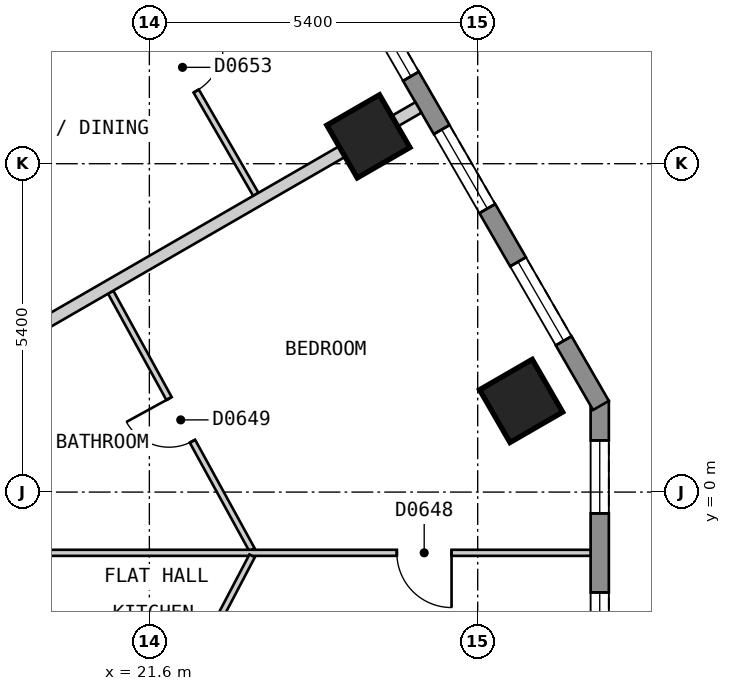
"""IFC4 building model, lengths in metres.
Left out: names, types, materials, properties, quantities, classifications, styles, units other than length and angle.
Written with IfcOpenShell. Run it as: python <this file> out.ifc"""

import sys

from ifc_helpers import new_model, si_unit, direction, frame, frame_2d, origin, origin_2d, place, context, subcontext, project, spatial, polyline, rectangle, outline, extrude, element, fill, save


model = new_model("IFC4")
c1 = context("Model", 3, precision=1e-05, world=origin(), true_north=direction((0.0, 1.0)))
c2 = subcontext(c1, "Body", "Model", "MODEL_VIEW")
j1 = project(units=[si_unit("LENGTHUNIT", "METRE"), si_unit("PLANEANGLEUNIT", "RADIAN")], contexts=[c1])
p1 = place(None, origin())
s1 = spatial("IfcSite", under=j1, at=p1, CompositionType="ELEMENT")
p2 = place(p1, origin())
s2 = spatial("IfcBuilding", under=s1, at=p2, CompositionType="ELEMENT")
p3 = place(p2, frame((0.0, 0.0, 81.0)))
s3 = spatial("IfcBuildingStorey", under=s2, at=p3, CompositionType="ELEMENT", Elevation=81.0)
for number, where, z_axis, x_axis in (
    (1, (27.714, 1.499, 0.0), (0.0, 0.0, 1.0), (-0.5, 0.866, 0.0)),
    (2, (25.202, 5.85, 0.0), (0.0, 0.0, 1.0), (-0.5, 0.866, 0.0)),
):
    element("IfcColumn", number, at=place(p3, frame(where, z_axis=z_axis, x_axis=x_axis)), inside=s3, PredefinedType="COLUMN", context=c2, shape_type="SweptSolid", body=[
        extrude(rectangle(XDim=1.0, YDim=1.0, at=origin_2d()), origin(), (0.0, 0.0, 1.0), 3.0),
    ])
p4 = place(p3, frame((29.007, -3.5, 0.0), z_axis=(0.0, 0.0, 1.0), x_axis=(0.0, 1.0, 0.0)))
e3 = element("IfcWall", 3, at=p4, inside=s3, PredefinedType="SOLIDWALL", context=c2, shape_type="SweptSolid", body=[
    extrude(outline(polyline([(0.0, -0.15), (5.0, -0.15), (4.92, 0.15), (0.08, 0.15), (0.0, -0.15)])), origin(), (0.0, 0.0, 1.0), 2.7),
])
p5 = place(p4, frame((0.65, 0.0, 0.15)))
e4 = element("IfcOpeningElement", 4, at=p5, cuts=e3, PredefinedType="OPENING", context=c2, shape_type="SweptSolid", body=[
    extrude(rectangle(XDim=1.2, YDim=2.1, at=frame_2d((0.6, 1.05))), frame((0.0, 0.16, 0.0), z_axis=(0.0, -1.0, 0.0), x_axis=(1.0, 0.0, 0.0)), (0.0, 0.0, 1.0), 0.32),
])
p6 = place(p4, frame((3.15, 0.0, 0.15)))
e5 = element("IfcOpeningElement", 5, at=p6, cuts=e3, PredefinedType="OPENING", context=c2, shape_type="SweptSolid", body=[
    extrude(rectangle(XDim=1.2, YDim=2.1, at=frame_2d((0.6, 1.05))), frame((0.0, 0.16, 0.0), z_axis=(0.0, -1.0, 0.0), x_axis=(1.0, 0.0, 0.0)), (0.0, 0.0, 1.0), 0.32),
])
p7 = place(p3, frame((29.027, 1.425, 0.0), z_axis=(0.0, 0.0, 1.0), x_axis=(-0.500027479704, 0.866009537788, 0.0)))
e6 = element("IfcWall", 6, at=p7, inside=s3, PredefinedType="SOLIDWALL", context=c2, shape_type="SweptSolid", body=[
    extrude(outline(polyline([(0.0, -0.15), (26.559, -0.15), (26.478, 0.15), (0.08, 0.15), (0.0, -0.15)])), origin(), (0.0, 0.0, 1.0), 2.7),
])
p8 = place(p7, frame((1.227, 0.0, 0.15)))
e7 = element("IfcOpeningElement", 7, at=p8, cuts=e6, PredefinedType="OPENING", context=c2, shape_type="SweptSolid", body=[
    extrude(rectangle(XDim=1.5, YDim=2.1, at=frame_2d((0.75, 1.05))), frame((0.0, 0.16, 0.0), z_axis=(0.0, -1.0, 0.0), x_axis=(1.0, 0.0, 0.0)), (0.0, 0.0, 1.0), 0.32),
])
p9 = place(p7, frame((3.738, 0.0, 0.15)))
e8 = element("IfcOpeningElement", 8, at=p9, cuts=e6, PredefinedType="OPENING", context=c2, shape_type="SweptSolid", body=[
    extrude(rectangle(XDim=1.5, YDim=2.1, at=frame_2d((0.75, 1.05))), frame((0.0, 0.16, 0.0), z_axis=(0.0, -1.0, 0.0), x_axis=(1.0, 0.0, 0.0)), (0.0, 0.0, 1.0), 0.32),
])
p10 = place(p7, frame((6.25, 0.0, 0.15)))
e9 = element("IfcOpeningElement", 9, at=p10, cuts=e6, PredefinedType="OPENING", context=c2, shape_type="SweptSolid", body=[
    extrude(rectangle(XDim=1.5, YDim=2.1, at=frame_2d((0.75, 1.05))), frame((0.0, 0.16, 0.0), z_axis=(0.0, -1.0, 0.0), x_axis=(1.0, 0.0, 0.0)), (0.0, 0.0, 1.0), 0.32),
])
p11 = place(p7, frame((8.761, 0.0, 0.15)))
e10 = element("IfcOpeningElement", 10, at=p11, cuts=e6, PredefinedType="OPENING", context=c2, shape_type="SweptSolid", body=[
    extrude(rectangle(XDim=1.5, YDim=2.1, at=frame_2d((0.75, 1.05))), frame((0.0, 0.16, 0.0), z_axis=(0.0, -1.0, 0.0), x_axis=(1.0, 0.0, 0.0)), (0.0, 0.0, 1.0), 0.32),
])
p12 = place(p7, frame((11.273, 0.0, 0.15)))
e11 = element("IfcOpeningElement", 11, at=p12, cuts=e6, PredefinedType="OPENING", context=c2, shape_type="SweptSolid", body=[
    extrude(rectangle(XDim=1.5, YDim=2.1, at=frame_2d((0.75, 1.05))), frame((0.0, 0.16, 0.0), z_axis=(0.0, -1.0, 0.0), x_axis=(1.0, 0.0, 0.0)), (0.0, 0.0, 1.0), 0.32),
])
p13 = place(p7, frame((13.785, 0.0, 0.15)))
e12 = element("IfcOpeningElement", 12, at=p13, cuts=e6, PredefinedType="OPENING", context=c2, shape_type="SweptSolid", body=[
    extrude(rectangle(XDim=1.5, YDim=2.1, at=frame_2d((0.75, 1.05))), frame((0.0, 0.16, 0.0), z_axis=(0.0, -1.0, 0.0), x_axis=(1.0, 0.0, 0.0)), (0.0, 0.0, 1.0), 0.32),
])
p14 = place(p7, frame((16.296, 0.0, 0.15)))
e13 = element("IfcOpeningElement", 13, at=p14, cuts=e6, PredefinedType="OPENING", context=c2, shape_type="SweptSolid", body=[
    extrude(rectangle(XDim=1.5, YDim=2.1, at=frame_2d((0.75, 1.05))), frame((0.0, 0.16, 0.0), z_axis=(0.0, -1.0, 0.0), x_axis=(1.0, 0.0, 0.0)), (0.0, 0.0, 1.0), 0.32),
])
p15 = place(p7, frame((18.807, 0.0, 0.15)))
e14 = element("IfcOpeningElement", 14, at=p15, cuts=e6, PredefinedType="OPENING", context=c2, shape_type="SweptSolid", body=[
    extrude(rectangle(XDim=1.5, YDim=2.1, at=frame_2d((0.75, 1.05))), frame((0.0, 0.16, 0.0), z_axis=(0.0, -1.0, 0.0), x_axis=(1.0, 0.0, 0.0)), (0.0, 0.0, 1.0), 0.32),
])
p16 = place(p7, frame((21.319, 0.0, 0.15)))
e15 = element("IfcOpeningElement", 15, at=p16, cuts=e6, PredefinedType="OPENING", context=c2, shape_type="SweptSolid", body=[
    extrude(rectangle(XDim=1.5, YDim=2.1, at=frame_2d((0.75, 1.05))), frame((0.0, 0.16, 0.0), z_axis=(0.0, -1.0, 0.0), x_axis=(1.0, 0.0, 0.0)), (0.0, 0.0, 1.0), 0.32),
])
p17 = place(p7, frame((23.831, 0.0, 0.15)))
e16 = element("IfcOpeningElement", 16, at=p17, cuts=e6, PredefinedType="OPENING", context=c2, shape_type="SweptSolid", body=[
    extrude(rectangle(XDim=1.5, YDim=2.1, at=frame_2d((0.75, 1.05))), frame((0.0, 0.16, 0.0), z_axis=(0.0, -1.0, 0.0), x_axis=(1.0, 0.0, 0.0)), (0.0, 0.0, 1.0), 0.32),
])
p18 = place(p3, frame((20.914, 9.117, 0.0), z_axis=(0.0, 0.0, 1.0), x_axis=(0.500007182864, -0.866021256716, 0.0)))
e17 = element("IfcWall", 17, at=p18, inside=s3, PredefinedType="PARTITIONING", context=c2, shape_type="SweptSolid", body=[
    extrude(rectangle(XDim=4.874, YDim=0.1, at=frame_2d((2.437, 0.0))), origin(), (0.0, 0.0, 1.0), 2.7),
])
p19 = place(p18, frame((2.012, 0.0, 0.0)))
e18 = element("IfcOpeningElement", 18, at=p19, cuts=e17, PredefinedType="OPENING", context=c2, shape_type="SweptSolid", body=[
    extrude(rectangle(XDim=0.9, YDim=2.1, at=frame_2d((0.45, 1.05))), frame((0.0, 0.06, 0.0), z_axis=(0.0, -1.0, 0.0), x_axis=(1.0, 0.0, 0.0)), (0.0, 0.0, 1.0), 0.12),
])
p20 = place(p3, frame((20.964, 3.287, 0.0), z_axis=(0.0, 0.0, 1.0), x_axis=(0.4810005962, -0.876720266936, 0.0)))
e19 = element("IfcWall", 19, at=p20, inside=s3, PredefinedType="PARTITIONING", context=c2, shape_type="SweptSolid", body=[
    extrude(rectangle(XDim=4.83, YDim=0.1, at=frame_2d((2.415, 0.0))), origin(), (0.0, 0.0, 1.0), 2.7),
])
p21 = place(p20, frame((1.995, 0.0, 0.0)))
e20 = element("IfcOpeningElement", 20, at=p21, cuts=e19, PredefinedType="OPENING", context=c2, shape_type="SweptSolid", body=[
    extrude(rectangle(XDim=0.8, YDim=2.1, at=frame_2d((0.4, 1.05))), frame((0.0, 0.06, 0.0), z_axis=(0.0, -1.0, 0.0), x_axis=(1.0, 0.0, 0.0)), (0.0, 0.0, 1.0), 0.12),
])
p22 = place(p3, frame((18.547, -1.275, 0.0), z_axis=(0.0, 0.0, 1.0), x_axis=(0.85733334763, -0.514761625456, 0.0)))
e21 = element("IfcWall", 21, at=p22, inside=s3, PredefinedType="PARTITIONING", context=c2, shape_type="SweptSolid", body=[
    extrude(rectangle(XDim=4.051, YDim=0.1, at=frame_2d((2.025, 0.0))), origin(), (0.0, 0.0, 1.0), 2.7),
])
p23 = place(p22, frame((1.55, 0.0, 0.0)))
e22 = element("IfcOpeningElement", 22, at=p23, cuts=e21, PredefinedType="OPENING", context=c2, shape_type="SweptSolid", body=[
    extrude(rectangle(XDim=0.9, YDim=2.1, at=frame_2d((0.45, 1.05))), frame((0.0, 0.06, 0.0), z_axis=(0.0, -1.0, 0.0), x_axis=(1.0, 0.0, 0.0)), (0.0, 0.0, 1.0), 0.12),
])
p24 = place(p3, frame((18.591, -0.999, 0.0), z_axis=(0.0, 0.0, 1.0), x_axis=(1.0, 0.0, 0.0)))
e23 = element("IfcWall", 23, at=p24, inside=s3, PredefinedType="PARTITIONING", context=c2, shape_type="SweptSolid", body=[
    extrude(rectangle(XDim=10.266, YDim=0.1, at=frame_2d((5.133, 0.0))), origin(), (0.0, 0.0, 1.0), 2.7),
])
p25 = place(p24, frame((7.079, 0.0, 0.0)))
e24 = element("IfcOpeningElement", 24, at=p25, cuts=e23, PredefinedType="OPENING", context=c2, shape_type="SweptSolid", body=[
    extrude(rectangle(XDim=0.9, YDim=2.1, at=frame_2d((0.45, 1.05))), frame((0.0, 0.06, 0.0), z_axis=(0.0, -1.0, 0.0), x_axis=(1.0, 0.0, 0.0)), (0.0, 0.0, 1.0), 0.12),
])
p26 = place(p3, frame((22.053, -3.403, 0.0), z_axis=(0.0, 0.0, 1.0), x_axis=(0.465190117005, 0.885210796952, 0.0)))
e25 = element("IfcWall", 25, at=p26, inside=s3, PredefinedType="PARTITIONING", context=c2, shape_type="SweptSolid", body=[
    extrude(rectangle(XDim=2.659, YDim=0.1, at=frame_2d((1.33, 0.0))), origin(), (0.0, 0.0, 1.0), 2.7),
])
p27 = place(p3, frame((14.853, 5.675, 0.0), z_axis=(0.0, 0.0, 1.0), x_axis=(0.866016855193, 0.500014806302, 0.0)))
e26 = element("IfcWall", 26, at=p27, inside=s3, PredefinedType="PARTITIONING", context=c2, shape_type="SweptSolid", body=[
    extrude(rectangle(XDim=10.0, YDim=0.1, at=frame_2d((5.0, 0.0))), origin(), (0.0, 0.0, 1.0), 2.7),
])
p28 = place(p27, frame((4.775, 0.0, 0.0)))
e27 = element("IfcOpeningElement", 27, at=p28, cuts=e26, PredefinedType="OPENING", context=c2, shape_type="SweptSolid", body=[
    extrude(rectangle(XDim=0.9, YDim=2.1, at=frame_2d((0.45, 1.05))), frame((0.0, 0.06, 0.0), z_axis=(0.0, -1.0, 0.0), x_axis=(1.0, 0.0, 0.0)), (0.0, 0.0, 1.0), 0.12),
])
p29 = place(p3, frame((17.365, 1.325, 0.0), z_axis=(0.0, 0.0, 1.0), x_axis=(0.866016855193, 0.500014806302, 0.0)))
e28 = element("IfcWall", 28, at=p29, inside=s3, PredefinedType="PARTITIONING", context=c2, shape_type="SweptSolid", body=[
    extrude(rectangle(XDim=10.0, YDim=0.2, at=frame_2d((5.0, 0.0))), origin(), (0.0, 0.0, 1.0), 2.7),
])
p30 = place(p5, origin())
e29 = element("IfcWindow", 29, at=p30, inside=s3, PartitioningType="SINGLE_PANEL", PredefinedType="WINDOW", context=c2, shape_type="SweptSolid", body=[
    extrude(rectangle(XDim=1.2, YDim=2.1, at=frame_2d((0.6, 1.05))), frame((0.0, 0.03, 0.0), z_axis=(0.0, -1.0, 0.0), x_axis=(1.0, 0.0, 0.0)), (0.0, 0.0, 1.0), 0.06),
])
fill(e4, e29)
p31 = place(p6, origin())
e30 = element("IfcWindow", 30, at=p31, inside=s3, PartitioningType="SINGLE_PANEL", PredefinedType="WINDOW", context=c2, shape_type="SweptSolid", body=[
    extrude(rectangle(XDim=1.2, YDim=2.1, at=frame_2d((0.6, 1.05))), frame((0.0, 0.03, 0.0), z_axis=(0.0, -1.0, 0.0), x_axis=(1.0, 0.0, 0.0)), (0.0, 0.0, 1.0), 0.06),
])
fill(e5, e30)
p32 = place(p8, origin())
e31 = element("IfcWindow", 31, at=p32, inside=s3, PartitioningType="SINGLE_PANEL", PredefinedType="WINDOW", context=c2, shape_type="SweptSolid", body=[
    extrude(rectangle(XDim=1.5, YDim=2.1, at=frame_2d((0.75, 1.05))), frame((0.0, 0.03, 0.0), z_axis=(0.0, -1.0, 0.0), x_axis=(1.0, 0.0, 0.0)), (0.0, 0.0, 1.0), 0.06),
])
fill(e7, e31)
p33 = place(p9, origin())
e32 = element("IfcWindow", 32, at=p33, inside=s3, PartitioningType="SINGLE_PANEL", PredefinedType="WINDOW", context=c2, shape_type="SweptSolid", body=[
    extrude(rectangle(XDim=1.5, YDim=2.1, at=frame_2d((0.75, 1.05))), frame((0.0, 0.03, 0.0), z_axis=(0.0, -1.0, 0.0), x_axis=(1.0, 0.0, 0.0)), (0.0, 0.0, 1.0), 0.06),
])
fill(e8, e32)
p34 = place(p10, origin())
e33 = element("IfcWindow", 33, at=p34, inside=s3, PartitioningType="SINGLE_PANEL", PredefinedType="WINDOW", context=c2, shape_type="SweptSolid", body=[
    extrude(rectangle(XDim=1.5, YDim=2.1, at=frame_2d((0.75, 1.05))), frame((0.0, 0.03, 0.0), z_axis=(0.0, -1.0, 0.0), x_axis=(1.0, 0.0, 0.0)), (0.0, 0.0, 1.0), 0.06),
])
fill(e9, e33)
p35 = place(p25, origin())
e34 = element("IfcDoor", 34, at=p35, inside=s3, OperationType="SINGLE_SWING_RIGHT", PredefinedType="DOOR", context=c2, shape_type="SweptSolid", body=[
    extrude(rectangle(XDim=0.9, YDim=2.1, at=frame_2d((0.45, 1.05))), frame((0.0, 0.025, 0.0), z_axis=(0.0, -1.0, 0.0), x_axis=(1.0, 0.0, 0.0)), (0.0, 0.0, 1.0), 0.05),
])
fill(e24, e34)
p36 = place(p21, origin())
e35 = element("IfcDoor", 35, at=p36, inside=s3, OperationType="SINGLE_SWING_LEFT", PredefinedType="DOOR", context=c2, shape_type="SweptSolid", body=[
    extrude(rectangle(XDim=0.8, YDim=2.1, at=frame_2d((0.4, 1.05))), frame((0.0, 0.025, 0.0), z_axis=(0.0, -1.0, 0.0), x_axis=(1.0, 0.0, 0.0)), (0.0, 0.0, 1.0), 0.05),
])
fill(e20, e35)
p37 = place(p19, origin())
e36 = element("IfcDoor", 36, at=p37, inside=s3, OperationType="SINGLE_SWING_LEFT", PredefinedType="DOOR", context=c2, shape_type="SweptSolid", body=[
    extrude(rectangle(XDim=0.9, YDim=2.1, at=frame_2d((0.45, 1.05))), frame((0.0, 0.025, 0.0), z_axis=(0.0, -1.0, 0.0), x_axis=(1.0, 0.0, 0.0)), (0.0, 0.0, 1.0), 0.05),
])
fill(e18, e36)
save(model, sys.argv[1])
